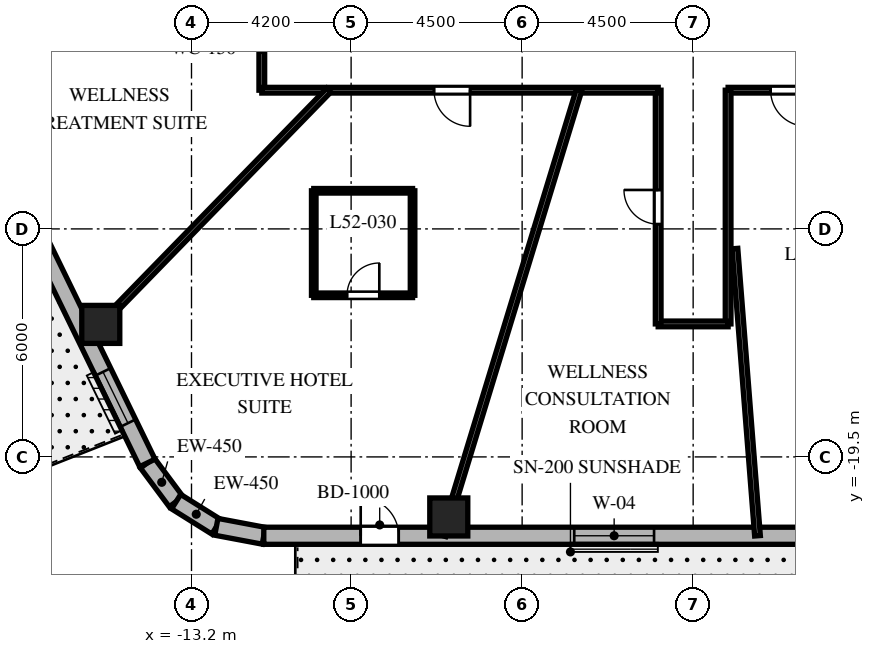
"""IFC4 building model, lengths in metres.
Left out: names, types, materials, properties, quantities, classifications, styles, units other than length and angle.
Written with IfcOpenShell. Run it as: python <this file> out.ifc"""

import sys

from ifc_helpers import new_model, si_unit, direction, frame, frame_2d, origin, origin_2d, place, context, subcontext, project, spatial, rectangle, extrude, element, fill, save


model = new_model("IFC4")
c1 = context("Model", 3, precision=1e-05, world=origin(), true_north=direction((0.0, 1.0)))
c2 = subcontext(c1, "Body", "Model", "MODEL_VIEW")
j1 = project(units=[si_unit("LENGTHUNIT", "METRE"), si_unit("PLANEANGLEUNIT", "RADIAN")], contexts=[c1])
p1 = place(None, origin())
s1 = spatial("IfcSite", under=j1, at=p1, CompositionType="ELEMENT")
p2 = place(p1, origin())
s2 = spatial("IfcBuilding", under=s1, at=p2, CompositionType="ELEMENT")
p3 = place(p2, frame((0.0, 0.0, 210.3)))
s3 = spatial("IfcBuildingStorey", under=s2, at=p3, CompositionType="ELEMENT", Elevation=210.3)
for number, where, z_axis, x_axis in (
    (1, (-6.43, -21.08, 0.0), (0.0, 0.0, 1.0), (1.0, 0.0, 0.0)),
    (2, (-15.587, -16.013, 0.0), (0.0, 0.0, 1.0), (1.0, 0.0, 0.0)),
):
    element("IfcColumn", number, at=place(p3, frame(where, z_axis=z_axis, x_axis=x_axis)), inside=s3, PredefinedType="COLUMN", context=c2, shape_type="SweptSolid", body=[
        extrude(rectangle(XDim=1.0, YDim=1.0, at=origin_2d()), origin(), (0.0, 0.0, 1.0), 3.8),
    ])
p4 = place(p3, frame((-14.362, -19.658, 0.0), z_axis=(0.0, 0.0, 1.0), x_axis=(0.596642462792, -0.80250717853, 0.0)))
e3 = element("IfcWall", 3, at=p4, inside=s3, PredefinedType="SOLIDWALL", context=c2, shape_type="SweptSolid", body=[
    extrude(rectangle(XDim=1.27, YDim=0.45, at=frame_2d((0.635, 0.0))), origin(), (0.0, 0.0, 1.0), 3.5),
])
p5 = place(p3, frame((-13.604, -20.678, 0.0), z_axis=(0.0, 0.0, 1.0), x_axis=(0.847910404124, -0.53013955387, 0.0)))
e4 = element("IfcWall", 4, at=p5, inside=s3, PredefinedType="SOLIDWALL", context=c2, shape_type="SweptSolid", body=[
    extrude(rectangle(XDim=1.249, YDim=0.45, at=frame_2d((0.624, 0.0))), origin(), (0.0, 0.0, 1.0), 3.5),
])
p6 = place(p3, frame((-12.546, -21.34, 0.0), z_axis=(0.0, 0.0, 1.0), x_axis=(0.982686750835, -0.18527479519, 0.0)))
e5 = element("IfcWall", 5, at=p6, inside=s3, PredefinedType="SOLIDWALL", context=c2, shape_type="SweptSolid", body=[
    extrude(rectangle(XDim=1.27, YDim=0.45, at=frame_2d((0.635, 0.0))), origin(), (0.0, 0.0, 1.0), 3.5),
])
p7 = place(p3, frame((-11.298, -21.575, 0.0), z_axis=(0.0, 0.0, 1.0), x_axis=(1.0, 0.0, 0.0)))
e6 = element("IfcWall", 6, at=p7, inside=s3, PredefinedType="SOLIDWALL", context=c2, shape_type="SweptSolid", body=[
    extrude(rectangle(XDim=24.399, YDim=0.45, at=frame_2d((12.2, 0.0))), origin(), (0.0, 0.0, 1.0), 3.5),
])
p8 = place(p7, frame((2.55, 0.0, 0.0)))
e7 = element("IfcOpeningElement", 7, at=p8, cuts=e6, PredefinedType="OPENING", context=c2, shape_type="SweptSolid", body=[
    extrude(rectangle(XDim=1.0, YDim=2.15, at=frame_2d((0.5, 1.075))), frame((0.0, 0.235, 0.0), z_axis=(0.0, -1.0, 0.0), x_axis=(1.0, 0.0, 0.0)), (0.0, 0.0, 1.0), 0.47),
])
p9 = place(p7, frame((8.169, 0.0, 0.8)))
e8 = element("IfcOpeningElement", 8, at=p9, cuts=e6, PredefinedType="OPENING", context=c2, shape_type="SweptSolid", body=[
    extrude(rectangle(XDim=2.1, YDim=1.85, at=frame_2d((1.05, 0.925))), frame((0.0, 0.235, 0.0), z_axis=(0.0, -1.0, 0.0), x_axis=(1.0, 0.0, 0.0)), (0.0, 0.0, 1.0), 0.47),
])
p10 = place(p7, frame((14.922, 0.0, 0.8)))
e9 = element("IfcOpeningElement", 9, at=p10, cuts=e6, PredefinedType="OPENING", context=c2, shape_type="SweptSolid", body=[
    extrude(rectangle(XDim=2.1, YDim=1.85, at=frame_2d((1.05, 0.925))), frame((0.0, 0.235, 0.0), z_axis=(0.0, -1.0, 0.0), x_axis=(1.0, 0.0, 0.0)), (0.0, 0.0, 1.0), 0.47),
])
p11 = place(p7, frame((20.996, 0.0, 0.8)))
e10 = element("IfcOpeningElement", 10, at=p11, cuts=e6, PredefinedType="OPENING", context=c2, shape_type="SweptSolid", body=[
    extrude(rectangle(XDim=2.1, YDim=1.85, at=frame_2d((1.05, 0.925))), frame((0.0, 0.235, 0.0), z_axis=(0.0, -1.0, 0.0), x_axis=(1.0, 0.0, 0.0)), (0.0, 0.0, 1.0), 0.47),
])
p12 = place(p3, frame((-22.74, -2.452, 0.0), z_axis=(0.0, 0.0, 1.0), x_axis=(0.437753424814, -0.899095066755, 0.0)))
e11 = element("IfcWall", 11, at=p12, inside=s3, PredefinedType="SOLIDWALL", context=c2, shape_type="SweptSolid", body=[
    extrude(rectangle(XDim=19.137, YDim=0.45, at=frame_2d((9.569, 0.0))), origin(), (0.0, 0.0, 1.0), 3.5),
])
p13 = place(p12, frame((4.763, 0.0, 0.0)))
e12 = element("IfcOpeningElement", 12, at=p13, cuts=e11, PredefinedType="OPENING", context=c2, shape_type="SweptSolid", body=[
    extrude(rectangle(XDim=0.95, YDim=2.15, at=frame_2d((0.475, 1.075))), frame((0.0, 0.235, 0.0), z_axis=(0.0, -1.0, 0.0), x_axis=(1.0, 0.0, 0.0)), (0.0, 0.0, 1.0), 0.47),
])
p14 = place(p12, frame((1.216, 0.0, 0.8)))
e13 = element("IfcOpeningElement", 13, at=p14, cuts=e11, PredefinedType="OPENING", context=c2, shape_type="SweptSolid", body=[
    extrude(rectangle(XDim=1.5, YDim=1.8, at=frame_2d((0.75, 0.9))), frame((0.0, 0.235, 0.0), z_axis=(0.0, -1.0, 0.0), x_axis=(1.0, 0.0, 0.0)), (0.0, 0.0, 1.0), 0.47),
])
p15 = place(p12, frame((8.87, 0.0, 0.8)))
e14 = element("IfcOpeningElement", 14, at=p15, cuts=e11, PredefinedType="OPENING", context=c2, shape_type="SweptSolid", body=[
    extrude(rectangle(XDim=1.5, YDim=1.8, at=frame_2d((0.75, 0.9))), frame((0.0, 0.235, 0.0), z_axis=(0.0, -1.0, 0.0), x_axis=(1.0, 0.0, 0.0)), (0.0, 0.0, 1.0), 0.47),
])
p16 = place(p12, frame((16.473, 0.0, 0.8)))
e15 = element("IfcOpeningElement", 15, at=p16, cuts=e11, PredefinedType="OPENING", context=c2, shape_type="SweptSolid", body=[
    extrude(rectangle(XDim=1.5, YDim=1.8, at=frame_2d((0.75, 0.9))), frame((0.0, 0.235, 0.0), z_axis=(0.0, -1.0, 0.0), x_axis=(1.0, 0.0, 0.0)), (0.0, 0.0, 1.0), 0.47),
])
p17 = place(p3, frame((-11.35, -9.85, 0.0), z_axis=(0.0, 0.0, 1.0), x_axis=(0.0, 1.0, 0.0)))
e16 = element("IfcWall", 16, at=p17, inside=s3, PredefinedType="PARTITIONING", context=c2, shape_type="SweptSolid", body=[
    extrude(rectangle(XDim=12.4, YDim=0.15, at=frame_2d((6.2, 0.0))), origin(), (0.0, 0.0, 1.0), 2.99),
])
p18 = place(p17, frame((10.017, 0.0, 0.0)))
e17 = element("IfcOpeningElement", 17, at=p18, cuts=e16, PredefinedType="OPENING", context=c2, shape_type="SweptSolid", body=[
    extrude(rectangle(XDim=0.9, YDim=2.03, at=frame_2d((0.45, 1.015))), frame((0.0, 0.085, 0.0), z_axis=(0.0, -1.0, 0.0), x_axis=(1.0, 0.0, 0.0)), (0.0, 0.0, 1.0), 0.17),
])
p19 = place(p17, frame((7.427, 0.0, 0.0)))
e18 = element("IfcOpeningElement", 18, at=p19, cuts=e16, PredefinedType="OPENING", context=c2, shape_type="SweptSolid", body=[
    extrude(rectangle(XDim=0.9, YDim=2.03, at=frame_2d((0.45, 1.015))), frame((0.0, 0.085, 0.0), z_axis=(0.0, -1.0, 0.0), x_axis=(1.0, 0.0, 0.0)), (0.0, 0.0, 1.0), 0.17),
])
p20 = place(p17, frame((3.01, 0.0, 0.0)))
e19 = element("IfcOpeningElement", 19, at=p20, cuts=e16, PredefinedType="OPENING", context=c2, shape_type="SweptSolid", body=[
    extrude(rectangle(XDim=0.95, YDim=2.03, at=frame_2d((0.475, 1.015))), frame((0.0, 0.085, 0.0), z_axis=(0.0, -1.0, 0.0), x_axis=(1.0, 0.0, 0.0)), (0.0, 0.0, 1.0), 0.17),
])
p21 = place(p3, frame((11.35, -9.85, 0.0), z_axis=(0.0, 0.0, 1.0), x_axis=(-1.0, 0.0, 0.0)))
e20 = element("IfcWall", 20, at=p21, inside=s3, PredefinedType="PARTITIONING", context=c2, shape_type="SweptSolid", body=[
    extrude(rectangle(XDim=10.43, YDim=0.15, at=frame_2d((5.215, 0.0))), origin(), (0.0, 0.0, 1.0), 2.99),
])
p22 = place(p21, frame((8.362, 0.0, 0.0)))
e21 = element("IfcOpeningElement", 21, at=p22, cuts=e20, PredefinedType="OPENING", context=c2, shape_type="SweptSolid", body=[
    extrude(rectangle(XDim=0.95, YDim=2.03, at=frame_2d((0.475, 1.015))), frame((0.0, 0.085, 0.0), z_axis=(0.0, -1.0, 0.0), x_axis=(1.0, 0.0, 0.0)), (0.0, 0.0, 1.0), 0.17),
])
p23 = place(p21, frame((5.73, 0.0, 0.0)))
e22 = element("IfcOpeningElement", 22, at=p23, cuts=e20, PredefinedType="OPENING", context=c2, shape_type="SweptSolid", body=[
    extrude(rectangle(XDim=0.9, YDim=2.03, at=frame_2d((0.45, 1.015))), frame((0.0, 0.085, 0.0), z_axis=(0.0, -1.0, 0.0), x_axis=(1.0, 0.0, 0.0)), (0.0, 0.0, 1.0), 0.17),
])
p24 = place(p21, frame((2.098, 0.0, 0.0)))
e23 = element("IfcOpeningElement", 23, at=p24, cuts=e20, PredefinedType="OPENING", context=c2, shape_type="SweptSolid", body=[
    extrude(rectangle(XDim=0.95, YDim=2.03, at=frame_2d((0.475, 1.015))), frame((0.0, 0.085, 0.0), z_axis=(0.0, -1.0, 0.0), x_axis=(1.0, 0.0, 0.0)), (0.0, 0.0, 1.0), 0.17),
])
p25 = place(p3, frame((0.92, -9.85, 0.0), z_axis=(0.0, 0.0, 1.0), x_axis=(0.0, -1.0, 0.0)))
e24 = element("IfcWall", 24, at=p25, inside=s3, PredefinedType="PARTITIONING", context=c2, shape_type="SweptSolid", body=[
    extrude(rectangle(XDim=6.15, YDim=0.15, at=frame_2d((3.075, 0.0))), origin(), (0.0, 0.0, 1.0), 3.026),
])
p26 = place(p3, frame((0.92, -16.0, 0.0), z_axis=(0.0, 0.0, 1.0), x_axis=(-1.0, 0.0, 0.0)))
e25 = element("IfcWall", 25, at=p26, inside=s3, PredefinedType="PARTITIONING", context=c2, shape_type="SweptSolid", body=[
    extrude(rectangle(XDim=1.84, YDim=0.15, at=frame_2d((0.92, 0.0))), origin(), (0.0, 0.0, 1.0), 3.5),
])
p27 = place(p3, frame((-0.92, -16.0, 0.0), z_axis=(0.0, 0.0, 1.0), x_axis=(0.0, 1.0, 0.0)))
e26 = element("IfcWall", 26, at=p27, inside=s3, PredefinedType="PARTITIONING", context=c2, shape_type="SweptSolid", body=[
    extrude(rectangle(XDim=6.15, YDim=0.15, at=frame_2d((3.075, 0.0))), origin(), (0.0, 0.0, 1.0), 3.026),
])
p28 = place(p27, frame((2.625, 0.0, 0.0)))
e27 = element("IfcOpeningElement", 27, at=p28, cuts=e26, PredefinedType="OPENING", context=c2, shape_type="SweptSolid", body=[
    extrude(rectangle(XDim=0.9, YDim=2.03, at=frame_2d((0.45, 1.015))), frame((0.0, 0.085, 0.0), z_axis=(0.0, -1.0, 0.0), x_axis=(1.0, 0.0, 0.0)), (0.0, 0.0, 1.0), 0.17),
])
p29 = place(p3, frame((-0.92, -9.85, 0.0), z_axis=(0.0, 0.0, 1.0), x_axis=(-1.0, 0.0, 0.0)))
e28 = element("IfcWall", 28, at=p29, inside=s3, PredefinedType="PARTITIONING", context=c2, shape_type="SweptSolid", body=[
    extrude(rectangle(XDim=10.43, YDim=0.15, at=frame_2d((5.215, 0.0))), origin(), (0.0, 0.0, 1.0), 2.99),
])
p30 = place(p29, frame((4.949, 0.0, 0.0)))
e29 = element("IfcOpeningElement", 29, at=p30, cuts=e28, PredefinedType="OPENING", context=c2, shape_type="SweptSolid", body=[
    extrude(rectangle(XDim=0.95, YDim=2.03, at=frame_2d((0.475, 1.015))), frame((0.0, 0.085, 0.0), z_axis=(0.0, -1.0, 0.0), x_axis=(1.0, 0.0, 0.0)), (0.0, 0.0, 1.0), 0.17),
])
p31 = place(p3, frame((-9.588, -9.85, 0.0), z_axis=(0.0, 0.0, 1.0), x_axis=(-0.697519469595, -0.716565830567, 0.0)))
e30 = element("IfcWall", 30, at=p31, inside=s3, PredefinedType="PARTITIONING", context=c2, shape_type="SweptSolid", body=[
    extrude(rectangle(XDim=9.126, YDim=0.15, at=frame_2d((4.563, 0.0))), origin(), (0.0, 0.0, 1.0), 2.74),
])
p32 = place(p3, frame((-3.004, -9.85, 0.0), z_axis=(0.0, 0.0, 1.0), x_axis=(-0.291775760688, -0.956486751333, 0.0)))
e31 = element("IfcWall", 31, at=p32, inside=s3, PredefinedType="PARTITIONING", context=c2, shape_type="SweptSolid", body=[
    extrude(rectangle(XDim=12.258, YDim=0.15, at=frame_2d((6.129, 0.0))), origin(), (0.0, 0.0, 1.0), 2.74),
])
p33 = place(p3, frame((1.1, -14.018, 0.0), z_axis=(0.0, 0.0, 1.0), x_axis=(0.078228275349, -0.996935472804, 0.0)))
e32 = element("IfcWall", 32, at=p33, inside=s3, PredefinedType="PARTITIONING", context=c2, shape_type="SweptSolid", body=[
    extrude(rectangle(XDim=7.581, YDim=0.15, at=frame_2d((3.79, 0.0))), origin(), (0.0, 0.0, 1.0), 2.74),
])
p34 = place(p3, frame((-9.983, -15.247, 0.0), z_axis=(0.0, 0.0, 1.0), x_axis=(1.0, 0.0, 0.0)))
e33 = element("IfcWall", 33, at=p34, inside=s3, PredefinedType="PARTITIONING", context=c2, shape_type="SweptSolid", body=[
    extrude(rectangle(XDim=2.6, YDim=0.12, at=frame_2d((1.3, 0.0))), origin(), (0.0, 0.0, 1.0), 3.072),
])
p35 = place(p34, frame((0.875, 0.0, 0.0)))
e34 = element("IfcOpeningElement", 34, at=p35, cuts=e33, PredefinedType="OPENING", context=c2, shape_type="SweptSolid", body=[
    extrude(rectangle(XDim=0.85, YDim=2.03, at=frame_2d((0.425, 1.015))), frame((0.0, 0.07, 0.0), z_axis=(0.0, -1.0, 0.0), x_axis=(1.0, 0.0, 0.0)), (0.0, 0.0, 1.0), 0.14),
])
p36 = place(p3, frame((-7.383, -15.247, 0.0), z_axis=(0.0, 0.0, 1.0), x_axis=(0.0, 1.0, 0.0)))
e35 = element("IfcWall", 35, at=p36, inside=s3, PredefinedType="PARTITIONING", context=c2, shape_type="SweptSolid", body=[
    extrude(rectangle(XDim=2.75, YDim=0.12, at=frame_2d((1.375, 0.0))), origin(), (0.0, 0.0, 1.0), 2.94),
])
p37 = place(p3, frame((-7.383, -12.497, 0.0), z_axis=(0.0, 0.0, 1.0), x_axis=(-1.0, 0.0, 0.0)))
e36 = element("IfcWall", 36, at=p37, inside=s3, PredefinedType="PARTITIONING", context=c2, shape_type="SweptSolid", body=[
    extrude(rectangle(XDim=2.6, YDim=0.12, at=frame_2d((1.3, 0.0))), origin(), (0.0, 0.0, 1.0), 2.94),
])
p38 = place(p3, frame((-9.983, -12.497, 0.0), z_axis=(0.0, 0.0, 1.0), x_axis=(0.0, -1.0, 0.0)))
e37 = element("IfcWall", 37, at=p38, inside=s3, PredefinedType="PARTITIONING", context=c2, shape_type="SweptSolid", body=[
    extrude(rectangle(XDim=2.75, YDim=0.12, at=frame_2d((1.375, 0.0))), origin(), (0.0, 0.0, 1.0), 3.072),
])
p39 = place(p8, origin())
e38 = element("IfcDoor", 38, at=p39, inside=s3, OperationType="SINGLE_SWING_LEFT", PredefinedType="DOOR", context=c2, shape_type="SweptSolid", body=[
    extrude(rectangle(XDim=1.0, YDim=2.15, at=frame_2d((0.5, 1.075))), frame((0.0, 0.025, 0.0), z_axis=(0.0, -1.0, 0.0), x_axis=(1.0, 0.0, 0.0)), (0.0, 0.0, 1.0), 0.05),
])
fill(e7, e38)
p40 = place(p9, origin())
e39 = element("IfcWindow", 39, at=p40, inside=s3, PartitioningType="SINGLE_PANEL", PredefinedType="WINDOW", context=c2, shape_type="SweptSolid", body=[
    extrude(rectangle(XDim=2.1, YDim=1.85, at=frame_2d((1.05, 0.925))), frame((0.0, 0.03, 0.0), z_axis=(0.0, -1.0, 0.0), x_axis=(1.0, 0.0, 0.0)), (0.0, 0.0, 1.0), 0.06),
])
fill(e8, e39)
p41 = place(p16, origin())
e40 = element("IfcWindow", 40, at=p41, inside=s3, PartitioningType="SINGLE_PANEL", PredefinedType="WINDOW", context=c2, shape_type="SweptSolid", body=[
    extrude(rectangle(XDim=1.5, YDim=1.8, at=frame_2d((0.75, 0.9))), frame((0.0, 0.03, 0.0), z_axis=(0.0, -1.0, 0.0), x_axis=(1.0, 0.0, 0.0)), (0.0, 0.0, 1.0), 0.06),
])
fill(e15, e40)
p42 = place(p30, origin())
e41 = element("IfcDoor", 41, at=p42, inside=s3, OperationType="SINGLE_SWING_LEFT", PredefinedType="DOOR", context=c2, shape_type="SweptSolid", body=[
    extrude(rectangle(XDim=0.95, YDim=2.03, at=frame_2d((0.475, 1.015))), frame((0.0, 0.025, 0.0), z_axis=(0.0, -1.0, 0.0), x_axis=(1.0, 0.0, 0.0)), (0.0, 0.0, 1.0), 0.05),
])
fill(e29, e41)
p43 = place(p35, origin())
e42 = element("IfcDoor", 42, at=p43, inside=s3, OperationType="SINGLE_SWING_RIGHT", PredefinedType="DOOR", context=c2, shape_type="SweptSolid", body=[
    extrude(rectangle(XDim=0.85, YDim=2.03, at=frame_2d((0.425, 1.015))), frame((0.0, 0.025, 0.0), z_axis=(0.0, -1.0, 0.0), x_axis=(1.0, 0.0, 0.0)), (0.0, 0.0, 1.0), 0.05),
])
fill(e34, e42)
p44 = place(p28, origin())
e43 = element("IfcDoor", 43, at=p44, inside=s3, OperationType="SINGLE_SWING_RIGHT", PredefinedType="DOOR", context=c2, shape_type="SweptSolid", body=[
    extrude(rectangle(XDim=0.9, YDim=2.03, at=frame_2d((0.45, 1.015))), frame((0.0, 0.025, 0.0), z_axis=(0.0, -1.0, 0.0), x_axis=(1.0, 0.0, 0.0)), (0.0, 0.0, 1.0), 0.05),
])
fill(e27, e43)
p45 = place(p22, origin())
e44 = element("IfcDoor", 44, at=p45, inside=s3, OperationType="SINGLE_SWING_LEFT", PredefinedType="DOOR", context=c2, shape_type="SweptSolid", body=[
    extrude(rectangle(XDim=0.95, YDim=2.03, at=frame_2d((0.475, 1.015))), frame((0.0, 0.025, 0.0), z_axis=(0.0, -1.0, 0.0), x_axis=(1.0, 0.0, 0.0)), (0.0, 0.0, 1.0), 0.05),
])
fill(e21, e44)
save(model, sys.argv[1])
